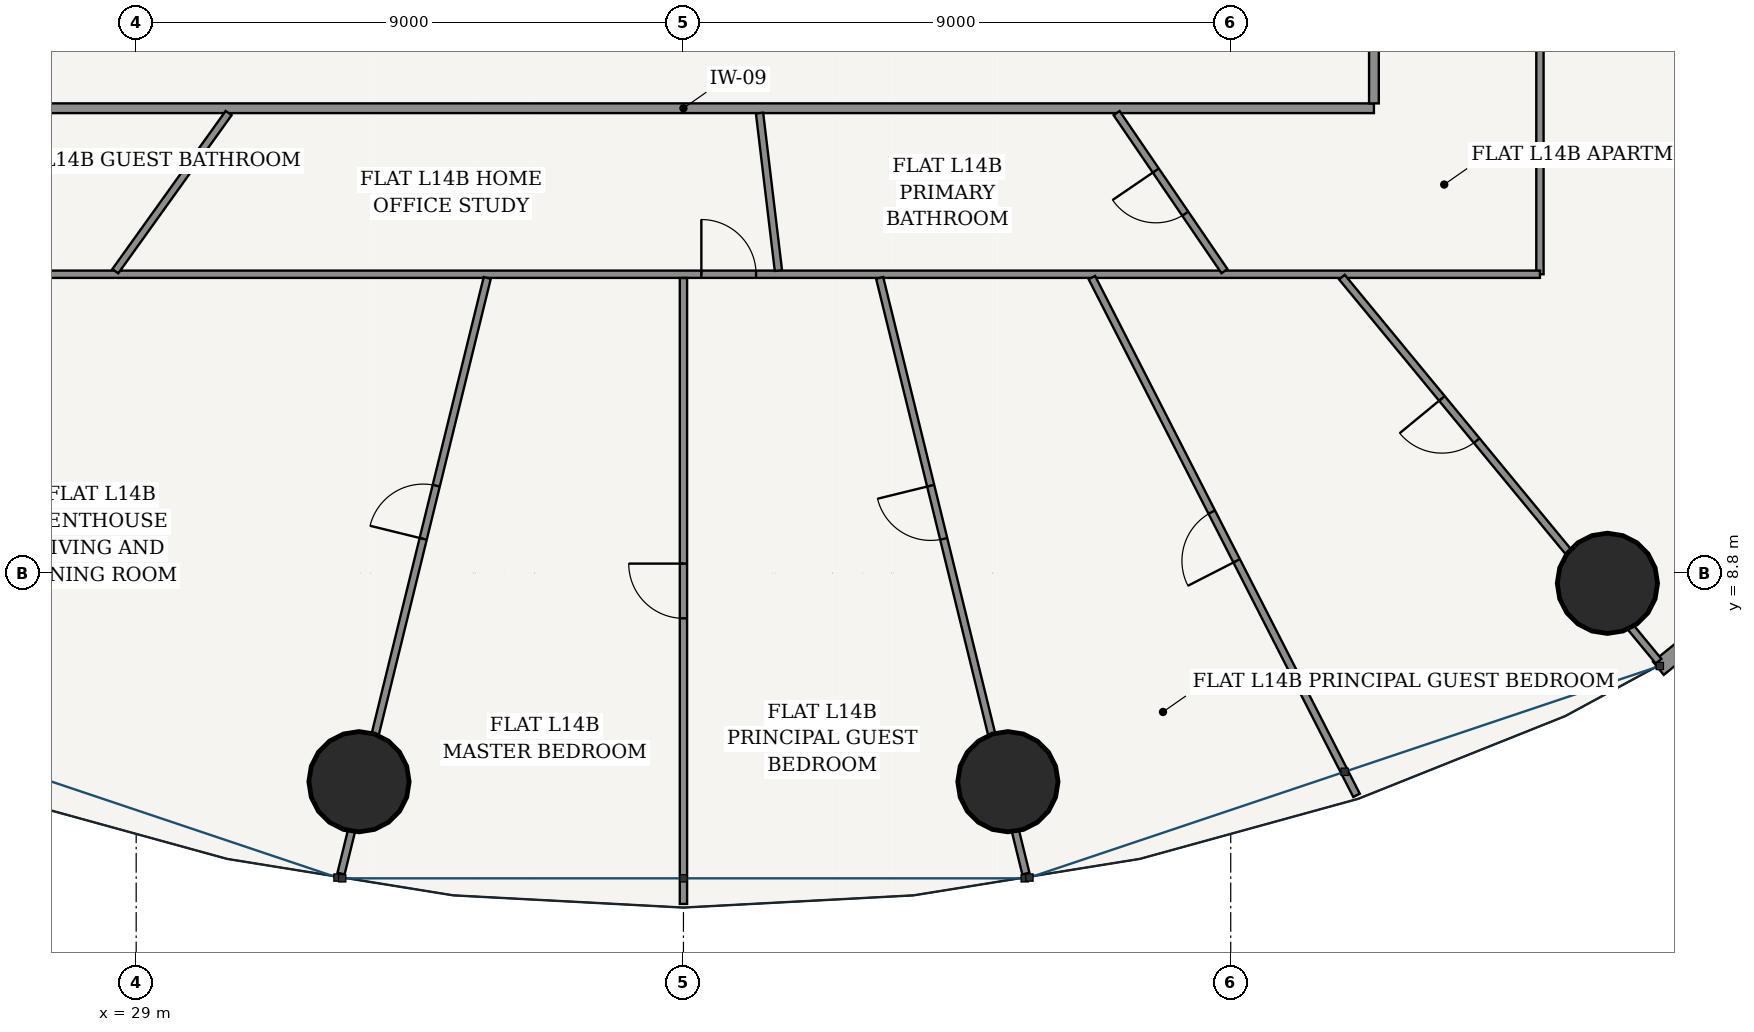
"""IFC4 building model, lengths in metres.
Left out: names, types, materials, properties, quantities, classifications, styles, units other than length and angle.
Written with IfcOpenShell. Run it as: python <this file> out.ifc"""

import sys

from ifc_helpers import new_model, si_unit, direction, frame, frame_2d, origin, origin_2d, place, context, subcontext, project, spatial, rectangle, hollow_circle, extrude, source, transform, mapped, element, fill, save


model = new_model("IFC4")
c1 = context("Model", 3, precision=1e-05, world=origin(), true_north=direction((-0.2419218956, 0.970295726276)))
c2 = subcontext(c1, "Body", "Model", "MODEL_VIEW")
j1 = project(units=[si_unit("LENGTHUNIT", "METRE"), si_unit("PLANEANGLEUNIT", "RADIAN")], contexts=[c1])
p1 = place(None, origin())
s1 = spatial("IfcSite", under=j1, at=p1, CompositionType="ELEMENT")
p2 = place(p1, origin())
s2 = spatial("IfcBuilding", under=s1, at=p2, CompositionType="ELEMENT")
p3 = place(p2, frame((0.0, 0.0, 56.4)))
s3 = spatial("IfcBuildingStorey", under=s2, at=p3, CompositionType="ELEMENT", Elevation=56.4)
for number, where, z_axis, x_axis in (
    (1, (32.664, 5.37, 0.0), (0.0, 0.0, 1.0), (1.0, 0.0, 0.0)),
    (2, (43.336, 5.37, 0.0), (0.0, 0.0, 1.0), (1.0, 0.0, 0.0)),
    (3, (53.195, 8.632, 0.0), (0.0, 0.0, 1.0), (1.0, 0.0, 0.0)),
):
    element("IfcColumn", number, at=place(p3, frame(where, z_axis=z_axis, x_axis=x_axis)), inside=s3, PredefinedType="COLUMN", context=c2, shape_type="SweptSolid", body=[
        extrude(hollow_circle(Radius=0.825, WallThickness=0.05, at=origin_2d()), origin(), (0.0, 0.0, 1.0), 3.6),
    ])
p4 = place(p3, frame((54.033, 7.235, 0.0), z_axis=(0.0, 0.0, 1.0), x_axis=(0.777016782851, 0.629479879875, 0.0)))
e4 = element("IfcWall", 4, at=p4, inside=s3, PredefinedType="SOLIDWALL", context=c2, shape_type="SweptSolid", body=[
    extrude(rectangle(XDim=10.447, YDim=0.28, at=frame_2d((5.223, 0.0))), origin(), (0.0, 0.0, 1.0), 3.32),
])
p5 = place(p4, frame((1.771, 0.0, 0.85)))
e5 = element("IfcOpeningElement", 5, at=p5, cuts=e4, PredefinedType="OPENING", context=c2, shape_type="SweptSolid", body=[
    extrude(rectangle(XDim=2.1, YDim=1.95, at=frame_2d((1.05, 0.975))), frame((0.0, 0.15, 0.0), z_axis=(0.0, -1.0, 0.0), x_axis=(1.0, 0.0, 0.0)), (0.0, 0.0, 1.0), 0.3),
])
p6 = place(p4, frame((6.576, 0.0, 0.85)))
e6 = element("IfcOpeningElement", 6, at=p6, cuts=e4, PredefinedType="OPENING", context=c2, shape_type="SweptSolid", body=[
    extrude(rectangle(XDim=2.1, YDim=1.95, at=frame_2d((1.05, 0.975))), frame((0.0, 0.15, 0.0), z_axis=(0.0, -1.0, 0.0), x_axis=(1.0, 0.0, 0.0)), (0.0, 0.0, 1.0), 0.3),
])
p7 = place(p3, frame((26.645, 16.445, 0.0), z_axis=(0.0, 0.0, 1.0), x_axis=(1.0, 0.0, 0.0)))
e7 = element("IfcWall", 7, at=p7, inside=s3, PredefinedType="PARTITIONING", context=c2, shape_type="SweptSolid", body=[
    extrude(rectangle(XDim=22.71, YDim=0.16, at=frame_2d((11.355, 0.0))), origin(), (0.0, 0.0, 1.0), 2.688),
])
p8 = place(p3, frame((49.355, 16.525, 0.0), z_axis=(0.0, 0.0, 1.0), x_axis=(0.0, 1.0, 0.0)))
e8 = element("IfcWall", 8, at=p8, inside=s3, PredefinedType="PARTITIONING", context=c2, shape_type="SweptSolid", body=[
    extrude(rectangle(XDim=20.55, YDim=0.16, at=frame_2d((10.275, 0.0))), origin(), (0.0, 0.0, 1.0), 2.688),
])
p9 = place(p8, frame((2.733, 0.0, 0.0)))
e9 = element("IfcOpeningElement", 9, at=p9, cuts=e8, PredefinedType="OPENING", context=c2, shape_type="SweptSolid", body=[
    extrude(rectangle(XDim=0.98, YDim=2.2, at=frame_2d((0.49, 1.1))), frame((0.0, 0.09, 0.0), z_axis=(0.0, -1.0, 0.0), x_axis=(1.0, 0.0, 0.0)), (0.0, 0.0, 1.0), 0.18),
])
p10 = place(p3, frame((52.085, 34.324, 0.0), z_axis=(0.0, 0.0, 1.0), x_axis=(0.0, -1.0, 0.0)))
e10 = element("IfcWall", 10, at=p10, inside=s3, PredefinedType="PARTITIONING", context=c2, shape_type="SweptSolid", body=[
    extrude(rectangle(XDim=20.609, YDim=0.12, at=frame_2d((10.305, 0.0))), origin(), (0.0, 0.0, 1.0), 2.688),
])
p11 = place(p10, frame((15.972, 0.0, 0.0)))
e11 = element("IfcOpeningElement", 11, at=p11, cuts=e10, PredefinedType="OPENING", context=c2, shape_type="SweptSolid", body=[
    extrude(rectangle(XDim=0.9, YDim=2.15, at=frame_2d((0.45, 1.075))), frame((0.0, 0.07, 0.0), z_axis=(0.0, -1.0, 0.0), x_axis=(1.0, 0.0, 0.0)), (0.0, 0.0, 1.0), 0.14),
])
p12 = place(p10, frame((3.058, 0.0, 0.0)))
e12 = element("IfcOpeningElement", 12, at=p12, cuts=e10, PredefinedType="OPENING", context=c2, shape_type="SweptSolid", body=[
    extrude(rectangle(XDim=0.9, YDim=2.15, at=frame_2d((0.45, 1.075))), frame((0.0, 0.07, 0.0), z_axis=(0.0, -1.0, 0.0), x_axis=(1.0, 0.0, 0.0)), (0.0, 0.0, 1.0), 0.14),
])
p13 = place(p3, frame((52.085, 13.715, 0.0), z_axis=(0.0, 0.0, 1.0), x_axis=(-1.0, 0.0, 0.0)))
e13 = element("IfcWall", 13, at=p13, inside=s3, PredefinedType="PARTITIONING", context=c2, shape_type="SweptSolid", body=[
    extrude(rectangle(XDim=28.17, YDim=0.12, at=frame_2d((14.085, 0.0))), origin(), (0.0, 0.0, 1.0), 2.688),
])
p14 = place(p13, frame((12.891, 0.0, 0.0)))
e14 = element("IfcOpeningElement", 14, at=p14, cuts=e13, PredefinedType="OPENING", context=c2, shape_type="SweptSolid", body=[
    extrude(rectangle(XDim=0.9, YDim=2.15, at=frame_2d((0.45, 1.075))), frame((0.0, 0.07, 0.0), z_axis=(0.0, -1.0, 0.0), x_axis=(1.0, 0.0, 0.0)), (0.0, 0.0, 1.0), 0.14),
])
p15 = place(p3, frame((34.773, 13.655, 0.0), z_axis=(0.0, 0.0, 1.0), x_axis=(-0.238375747469, -0.97117300365, 0.0)))
e15 = element("IfcWall", 15, at=p15, inside=s3, PredefinedType="PARTITIONING", context=c2, shape_type="SweptSolid", body=[
    extrude(rectangle(XDim=10.086, YDim=0.12, at=frame_2d((5.043, 0.0))), origin(), (0.0, 0.0, 1.0), 2.688),
])
p16 = place(p15, frame((3.518, 0.0, 0.0)))
e16 = element("IfcOpeningElement", 16, at=p16, cuts=e15, PredefinedType="OPENING", context=c2, shape_type="SweptSolid", body=[
    extrude(rectangle(XDim=0.9, YDim=2.15, at=frame_2d((0.45, 1.075))), frame((0.0, 0.07, 0.0), z_axis=(0.0, -1.0, 0.0), x_axis=(1.0, 0.0, 0.0)), (0.0, 0.0, 1.0), 0.14),
])
p17 = place(p3, frame((38.0, 13.653, 0.0), z_axis=(0.0, 0.0, 1.0), x_axis=(0.0, -1.0, 0.0)))
e17 = element("IfcWall", 17, at=p17, inside=s3, PredefinedType="PARTITIONING", context=c2, shape_type="SweptSolid", body=[
    extrude(rectangle(XDim=10.293, YDim=0.12, at=frame_2d((5.146, 0.0))), origin(), (0.0, 0.0, 1.0), 2.762),
])
p18 = place(p17, frame((4.697, 0.0, 0.0)))
e18 = element("IfcOpeningElement", 18, at=p18, cuts=e17, PredefinedType="OPENING", context=c2, shape_type="SweptSolid", body=[
    extrude(rectangle(XDim=0.9, YDim=2.15, at=frame_2d((0.45, 1.075))), frame((0.0, 0.07, 0.0), z_axis=(0.0, -1.0, 0.0), x_axis=(1.0, 0.0, 0.0)), (0.0, 0.0, 1.0), 0.14),
])
p19 = place(p3, frame((41.227, 13.655, 0.0), z_axis=(0.0, 0.0, 1.0), x_axis=(0.238375747469, -0.97117300365, 0.0)))
e19 = element("IfcWall", 19, at=p19, inside=s3, PredefinedType="PARTITIONING", context=c2, shape_type="SweptSolid", body=[
    extrude(rectangle(XDim=10.086, YDim=0.12, at=frame_2d((5.043, 0.0))), origin(), (0.0, 0.0, 1.0), 2.688),
])
p20 = place(p19, frame((3.519, 0.0, 0.0)))
e20 = element("IfcOpeningElement", 20, at=p20, cuts=e19, PredefinedType="OPENING", context=c2, shape_type="SweptSolid", body=[
    extrude(rectangle(XDim=0.9, YDim=2.15, at=frame_2d((0.45, 1.075))), frame((0.0, 0.07, 0.0), z_axis=(0.0, -1.0, 0.0), x_axis=(1.0, 0.0, 0.0)), (0.0, 0.0, 1.0), 0.14),
])
p21 = place(p3, frame((44.717, 13.66, 0.0), z_axis=(0.0, 0.0, 1.0), x_axis=(0.455131303234, -0.890424335256, 0.0)))
e21 = element("IfcWall", 21, at=p21, inside=s3, PredefinedType="PARTITIONING", context=c2, shape_type="SweptSolid", body=[
    extrude(rectangle(XDim=9.562, YDim=0.12, at=frame_2d((4.781, 0.0))), origin(), (0.0, 0.0, 1.0), 2.762),
])
p22 = place(p21, frame((4.331, 0.0, 0.0)))
e22 = element("IfcOpeningElement", 22, at=p22, cuts=e21, PredefinedType="OPENING", context=c2, shape_type="SweptSolid", body=[
    extrude(rectangle(XDim=0.9, YDim=2.15, at=frame_2d((0.45, 1.075))), frame((0.0, 0.07, 0.0), z_axis=(0.0, -1.0, 0.0), x_axis=(1.0, 0.0, 0.0)), (0.0, 0.0, 1.0), 0.14),
])
p23 = place(p3, frame((48.829, 13.667, 0.0), z_axis=(0.0, 0.0, 1.0), x_axis=(0.636177533893, -0.771542704826, 0.0)))
e23 = element("IfcWall", 23, at=p23, inside=s3, PredefinedType="PARTITIONING", context=c2, shape_type="SweptSolid", body=[
    extrude(rectangle(XDim=8.187, YDim=0.12, at=frame_2d((4.093, 0.0))), origin(), (0.0, 0.0, 1.0), 2.688),
])
p24 = place(p23, frame((2.584, 0.0, 0.0)))
e24 = element("IfcOpeningElement", 24, at=p24, cuts=e23, PredefinedType="OPENING", context=c2, shape_type="SweptSolid", body=[
    extrude(rectangle(XDim=0.9, YDim=2.15, at=frame_2d((0.45, 1.075))), frame((0.0, 0.07, 0.0), z_axis=(0.0, -1.0, 0.0), x_axis=(1.0, 0.0, 0.0)), (0.0, 0.0, 1.0), 0.14),
])
p25 = place(p3, frame((30.52, 16.365, 0.0), z_axis=(0.0, 0.0, 1.0), x_axis=(-0.582566008831, -0.812783393872, 0.0)))
e25 = element("IfcWall", 25, at=p25, inside=s3, PredefinedType="PARTITIONING", context=c2, shape_type="SweptSolid", body=[
    extrude(rectangle(XDim=3.198, YDim=0.12, at=frame_2d((1.599, 0.0))), origin(), (0.0, 0.0, 1.0), 3.32),
])
p26 = place(p3, frame((39.251, 16.365, 0.0), z_axis=(0.0, 0.0, 1.0), x_axis=(0.1191230636, -0.992879497078, 0.0)))
e26 = element("IfcWall", 26, at=p26, inside=s3, PredefinedType="PARTITIONING", context=c2, shape_type="SweptSolid", body=[
    extrude(rectangle(XDim=2.607, YDim=0.12, at=frame_2d((1.303, 0.0))), origin(), (0.0, 0.0, 1.0), 3.32),
])
p27 = place(p3, frame((45.123, 16.365, 0.0), z_axis=(0.0, 0.0, 1.0), x_axis=(0.563762888243, -0.825936683917, 0.0)))
e27 = element("IfcWall", 27, at=p27, inside=s3, PredefinedType="PARTITIONING", context=c2, shape_type="SweptSolid", body=[
    extrude(rectangle(XDim=3.146, YDim=0.12, at=frame_2d((1.573, 0.0))), origin(), (0.0, 0.0, 1.0), 3.32),
])
p28 = place(p27, frame((1.143, 0.0, 0.0)))
e28 = element("IfcOpeningElement", 28, at=p28, cuts=e27, PredefinedType="OPENING", context=c2, shape_type="SweptSolid", body=[
    extrude(rectangle(XDim=0.86, YDim=2.15, at=frame_2d((0.43, 1.075))), frame((0.0, 0.07, 0.0), z_axis=(0.0, -1.0, 0.0), x_axis=(1.0, 0.0, 0.0)), (0.0, 0.0, 1.0), 0.14),
])
m1 = source(origin(), c2, "Body", "SweptSolid", [
    extrude(rectangle(XDim=0.86, YDim=2.15, at=frame_2d((0.43, 1.075))), frame((0.0, 0.025, 0.0), z_axis=(0.0, -1.0, 0.0), x_axis=(1.0, 0.0, 0.0)), (0.0, 0.0, 1.0), 0.05),
])
p29 = place(p28, frame((0.86, 0.0, 0.0), z_axis=(0.0, 0.0, 1.0), x_axis=(-1.0, 0.0, 0.0)))
e29 = element("IfcDoor", 29, at=p29, inside=s3, OperationType="SINGLE_SWING_RIGHT", PredefinedType="DOOR", context=c2, shape_type="MappedRepresentation", body=[
    mapped(m1, transform((0.0, 0.0, 0.0), scale=1.0)),
])
fill(e28, e29)
m2 = source(origin(), c2, "Body", "SweptSolid", [
    extrude(rectangle(XDim=0.9, YDim=2.15, at=frame_2d((0.45, 1.075))), frame((0.0, 0.025, 0.0), z_axis=(0.0, -1.0, 0.0), x_axis=(1.0, 0.0, 0.0)), (0.0, 0.0, 1.0), 0.05),
])
p30 = place(p24, frame((0.9, 0.0, 0.0), z_axis=(0.0, 0.0, 1.0), x_axis=(-1.0, 0.0, 0.0)))
e30 = element("IfcDoor", 30, at=p30, inside=s3, OperationType="SINGLE_SWING_RIGHT", PredefinedType="DOOR", context=c2, shape_type="MappedRepresentation", body=[
    mapped(m2, transform((0.0, 0.0, 0.0), scale=1.0)),
])
fill(e24, e30)
p31 = place(p22, frame((0.9, 0.0, 0.0), z_axis=(0.0, 0.0, 1.0), x_axis=(-1.0, 0.0, 0.0)))
e31 = element("IfcDoor", 31, at=p31, inside=s3, OperationType="SINGLE_SWING_LEFT", PredefinedType="DOOR", context=c2, shape_type="MappedRepresentation", body=[
    mapped(m2, transform((0.0, 0.0, 0.0), scale=1.0)),
])
fill(e22, e31)
p32 = place(p20, frame((0.9, 0.0, 0.0), z_axis=(0.0, 0.0, 1.0), x_axis=(-1.0, 0.0, 0.0)))
e32 = element("IfcDoor", 32, at=p32, inside=s3, OperationType="SINGLE_SWING_RIGHT", PredefinedType="DOOR", context=c2, shape_type="MappedRepresentation", body=[
    mapped(m2, transform((0.0, 0.0, 0.0), scale=1.0)),
])
fill(e20, e32)
p33 = place(p14, frame((0.9, 0.0, 0.0), z_axis=(0.0, 0.0, 1.0), x_axis=(-1.0, 0.0, 0.0)))
e33 = element("IfcDoor", 33, at=p33, inside=s3, OperationType="SINGLE_SWING_LEFT", PredefinedType="DOOR", context=c2, shape_type="MappedRepresentation", body=[
    mapped(m2, transform((0.0, 0.0, 0.0), scale=1.0)),
])
fill(e14, e33)
p34 = place(p18, frame((0.9, 0.0, 0.0), z_axis=(0.0, 0.0, 1.0), x_axis=(-1.0, 0.0, 0.0)))
e34 = element("IfcDoor", 34, at=p34, inside=s3, OperationType="SINGLE_SWING_RIGHT", PredefinedType="DOOR", context=c2, shape_type="MappedRepresentation", body=[
    mapped(m2, transform((0.0, 0.0, 0.0), scale=1.0)),
])
fill(e18, e34)
p35 = place(p16, frame((0.9, 0.0, 0.0), z_axis=(0.0, 0.0, 1.0), x_axis=(-1.0, 0.0, 0.0)))
e35 = element("IfcDoor", 35, at=p35, inside=s3, OperationType="SINGLE_SWING_LEFT", PredefinedType="DOOR", context=c2, shape_type="MappedRepresentation", body=[
    mapped(m2, transform((0.0, 0.0, 0.0), scale=1.0)),
])
fill(e16, e35)
save(model, sys.argv[1])
